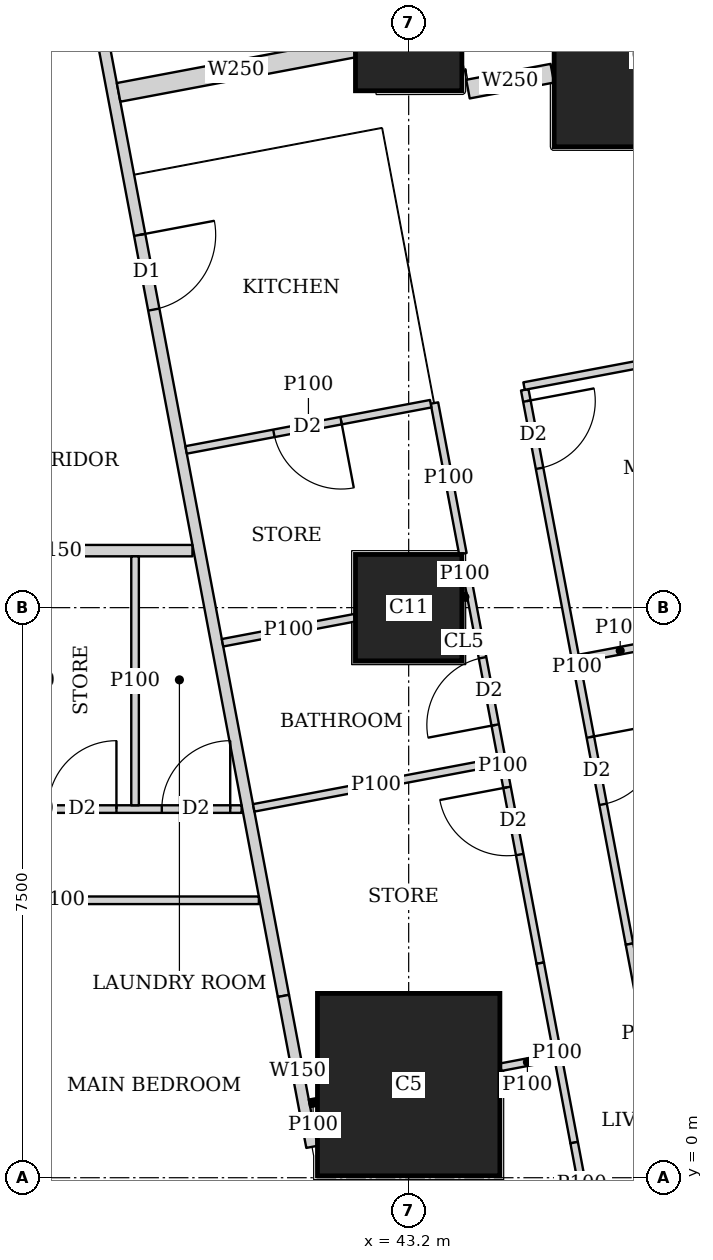
"""IFC4 building model, lengths in metres.
Left out: names, types, materials, properties, quantities, classifications, styles, units other than length and angle.
Written with IfcOpenShell. Run it as: python <this file> out.ifc"""

import sys

from ifc_helpers import new_model, si_unit, direction, frame, frame_2d, origin, origin_2d, place, context, subcontext, project, spatial, rectangle, extrude, element, fill, save


model = new_model("IFC4")
c1 = context("Model", 3, precision=1e-05, world=origin(), true_north=direction((0.0, 1.0)))
c2 = subcontext(c1, "Body", "Model", "MODEL_VIEW")
j1 = project(units=[si_unit("LENGTHUNIT", "METRE"), si_unit("PLANEANGLEUNIT", "RADIAN")], contexts=[c1])
p1 = place(None, origin())
s1 = spatial("IfcSite", under=j1, at=p1, CompositionType="ELEMENT")
p2 = place(p1, origin())
s2 = spatial("IfcBuilding", under=s1, at=p2, CompositionType="ELEMENT")
p3 = place(p2, frame((0.0, 0.0, 242.45)))
s3 = spatial("IfcBuildingStorey", under=s2, at=p3, CompositionType="ELEMENT", Elevation=242.45)
p4 = place(p3, frame((43.2, 1.225, 0.0), z_axis=(0.0, 0.0, 1.0), x_axis=(1.0, 0.0, 0.0)))
e1 = element("IfcColumn", 1, at=p4, inside=s3, PredefinedType="COLUMN", context=c2, shape_type="SweptSolid", body=[
    extrude(rectangle(XDim=2.4, YDim=2.4, at=origin_2d()), origin(), (0.0, 0.0, 1.0), 3.75),
])
for number, where, z_axis, x_axis in (
    (2, (43.2, 7.5, 0.0), (0.0, 0.0, 1.0), (1.0, 0.0, 0.0)),
    (3, (43.2, 15.0, 0.0), (0.0, 0.0, 1.0), (1.0, 0.0, 0.0)),
):
    element("IfcColumn", number, at=place(p3, frame(where, z_axis=z_axis, x_axis=x_axis)), inside=s3, PredefinedType="COLUMN", context=c2, shape_type="SweptSolid", body=[
        extrude(rectangle(XDim=1.4, YDim=1.4, at=origin_2d()), origin(), (0.0, 0.0, 1.0), 3.75),
    ])
p5 = place(p3, frame((46.314, 14.763, 0.0), z_axis=(0.0, 0.0, 1.0), x_axis=(1.0, 0.0, 0.0)))
e4 = element("IfcColumn", 4, at=p5, inside=s3, PredefinedType="COLUMN", context=c2, shape_type="SweptSolid", body=[
    extrude(rectangle(XDim=2.4, YDim=2.4, at=origin_2d()), origin(), (0.0, 0.0, 1.0), 3.75),
])
p6 = place(p3, frame((50.653, 2.703, 0.0), z_axis=(0.0, 0.0, 1.0), x_axis=(-0.185612026696, 0.982623109613, 0.0)))
e5 = element("IfcWall", 5, at=p6, inside=s3, PredefinedType="SOLIDWALL", context=c2, shape_type="SweptSolid", body=[
    extrude(rectangle(XDim=41.393, YDim=0.2, at=frame_2d((20.697, 0.0))), origin(), (0.0, 0.0, 1.0), 3.45),
])
p7 = place(p6, frame((1.633, 0.0, 0.9)))
e6 = element("IfcOpeningElement", 6, at=p7, cuts=e5, PredefinedType="OPENING", context=c2, shape_type="SweptSolid", body=[
    extrude(rectangle(XDim=1.8, YDim=1.5, at=frame_2d((0.9, 0.75))), frame((0.0, 0.11, 0.0), z_axis=(0.0, -1.0, 0.0), x_axis=(1.0, 0.0, 0.0)), (0.0, 0.0, 1.0), 0.22),
])
p8 = place(p6, frame((6.032, 0.0, 0.9)))
e7 = element("IfcOpeningElement", 7, at=p8, cuts=e5, PredefinedType="OPENING", context=c2, shape_type="SweptSolid", body=[
    extrude(rectangle(XDim=1.8, YDim=1.5, at=frame_2d((0.9, 0.75))), frame((0.0, 0.11, 0.0), z_axis=(0.0, -1.0, 0.0), x_axis=(1.0, 0.0, 0.0)), (0.0, 0.0, 1.0), 0.22),
])
p9 = place(p6, frame((9.848, 0.0, 0.9)))
e8 = element("IfcOpeningElement", 8, at=p9, cuts=e5, PredefinedType="OPENING", context=c2, shape_type="SweptSolid", body=[
    extrude(rectangle(XDim=1.8, YDim=1.5, at=frame_2d((0.9, 0.75))), frame((0.0, 0.11, 0.0), z_axis=(0.0, -1.0, 0.0), x_axis=(1.0, 0.0, 0.0)), (0.0, 0.0, 1.0), 0.22),
])
p10 = place(p6, frame((13.664, 0.0, 0.9)))
e9 = element("IfcOpeningElement", 9, at=p10, cuts=e5, PredefinedType="OPENING", context=c2, shape_type="SweptSolid", body=[
    extrude(rectangle(XDim=1.8, YDim=1.5, at=frame_2d((0.9, 0.75))), frame((0.0, 0.11, 0.0), z_axis=(0.0, -1.0, 0.0), x_axis=(1.0, 0.0, 0.0)), (0.0, 0.0, 1.0), 0.22),
])
p11 = place(p6, frame((17.481, 0.0, 0.9)))
e10 = element("IfcOpeningElement", 10, at=p11, cuts=e5, PredefinedType="OPENING", context=c2, shape_type="SweptSolid", body=[
    extrude(rectangle(XDim=1.8, YDim=1.5, at=frame_2d((0.9, 0.75))), frame((0.0, 0.11, 0.0), z_axis=(0.0, -1.0, 0.0), x_axis=(1.0, 0.0, 0.0)), (0.0, 0.0, 1.0), 0.22),
])
p12 = place(p6, frame((21.297, 0.0, 0.9)))
e11 = element("IfcOpeningElement", 11, at=p12, cuts=e5, PredefinedType="OPENING", context=c2, shape_type="SweptSolid", body=[
    extrude(rectangle(XDim=1.8, YDim=1.5, at=frame_2d((0.9, 0.75))), frame((0.0, 0.11, 0.0), z_axis=(0.0, -1.0, 0.0), x_axis=(1.0, 0.0, 0.0)), (0.0, 0.0, 1.0), 0.22),
])
p13 = place(p6, frame((25.113, 0.0, 0.9)))
e12 = element("IfcOpeningElement", 12, at=p13, cuts=e5, PredefinedType="OPENING", context=c2, shape_type="SweptSolid", body=[
    extrude(rectangle(XDim=1.8, YDim=1.5, at=frame_2d((0.9, 0.75))), frame((0.0, 0.11, 0.0), z_axis=(0.0, -1.0, 0.0), x_axis=(1.0, 0.0, 0.0)), (0.0, 0.0, 1.0), 0.22),
])
p14 = place(p6, frame((28.93, 0.0, 0.9)))
e13 = element("IfcOpeningElement", 13, at=p14, cuts=e5, PredefinedType="OPENING", context=c2, shape_type="SweptSolid", body=[
    extrude(rectangle(XDim=1.8, YDim=1.5, at=frame_2d((0.9, 0.75))), frame((0.0, 0.11, 0.0), z_axis=(0.0, -1.0, 0.0), x_axis=(1.0, 0.0, 0.0)), (0.0, 0.0, 1.0), 0.22),
])
p15 = place(p6, frame((32.746, 0.0, 0.9)))
e14 = element("IfcOpeningElement", 14, at=p15, cuts=e5, PredefinedType="OPENING", context=c2, shape_type="SweptSolid", body=[
    extrude(rectangle(XDim=1.8, YDim=1.5, at=frame_2d((0.9, 0.75))), frame((0.0, 0.11, 0.0), z_axis=(0.0, -1.0, 0.0), x_axis=(1.0, 0.0, 0.0)), (0.0, 0.0, 1.0), 0.22),
])
p16 = place(p6, frame((36.481, 0.0, 0.9)))
e15 = element("IfcOpeningElement", 15, at=p16, cuts=e5, PredefinedType="OPENING", context=c2, shape_type="SweptSolid", body=[
    extrude(rectangle(XDim=1.8, YDim=1.5, at=frame_2d((0.9, 0.75))), frame((0.0, 0.11, 0.0), z_axis=(0.0, -1.0, 0.0), x_axis=(1.0, 0.0, 0.0)), (0.0, 0.0, 1.0), 0.22),
])
p17 = place(p3, frame((40.355, 8.25, 0.0), z_axis=(0.0, 0.0, 1.0), x_axis=(-1.0, 0.0, 0.0)))
e16 = element("IfcWall", 16, at=p17, inside=s3, PredefinedType="SOLIDWALL", context=c2, shape_type="SweptSolid", body=[
    extrude(rectangle(XDim=3.654, YDim=0.15, at=frame_2d((1.827, 0.0))), origin(), (0.0, 0.0, 1.0), 3.45),
])
p18 = place(p3, frame((33.933, 42.73, 0.0), z_axis=(0.0, 0.0, 1.0), x_axis=(0.185595417643, -0.982626246825, 0.0)))
e17 = element("IfcWall", 17, at=p18, inside=s3, PredefinedType="SOLIDWALL", context=c2, shape_type="SweptSolid", body=[
    extrude(rectangle(XDim=41.051, YDim=0.15, at=frame_2d((20.525, 0.0))), origin(), (0.0, 0.0, 1.0), 2.45),
])
p19 = place(p18, frame((12.266, 0.0, 0.0)))
e18 = element("IfcOpeningElement", 18, at=p19, cuts=e17, PredefinedType="OPENING", context=c2, shape_type="SweptSolid", body=[
    extrude(rectangle(XDim=1.0, YDim=2.1, at=frame_2d((0.5, 1.05))), frame((0.0, 0.085, 0.0), z_axis=(0.0, -1.0, 0.0), x_axis=(1.0, 0.0, 0.0)), (0.0, 0.0, 1.0), 0.17),
])
p20 = place(p18, frame((16.082, 0.0, 0.0)))
e19 = element("IfcOpeningElement", 19, at=p20, cuts=e17, PredefinedType="OPENING", context=c2, shape_type="SweptSolid", body=[
    extrude(rectangle(XDim=1.0, YDim=2.1, at=frame_2d((0.5, 1.05))), frame((0.0, 0.085, 0.0), z_axis=(0.0, -1.0, 0.0), x_axis=(1.0, 0.0, 0.0)), (0.0, 0.0, 1.0), 0.17),
])
p21 = place(p18, frame((30.862, 0.0, 0.0)))
e20 = element("IfcOpeningElement", 20, at=p21, cuts=e17, PredefinedType="OPENING", context=c2, shape_type="SweptSolid", body=[
    extrude(rectangle(XDim=1.0, YDim=2.1, at=frame_2d((0.5, 1.05))), frame((0.0, 0.085, 0.0), z_axis=(0.0, -1.0, 0.0), x_axis=(1.0, 0.0, 0.0)), (0.0, 0.0, 1.0), 0.17),
])
p22 = place(p3, frame((41.552, 2.392, 0.0), z_axis=(0.0, 0.0, 1.0), x_axis=(0.185535500323, -0.982637561932, 0.0)))
e21 = element("IfcWall", 21, at=p22, inside=s3, PredefinedType="SOLIDWALL", context=c2, shape_type="SweptSolid", body=[
    extrude(rectangle(XDim=2.021, YDim=0.15, at=frame_2d((1.011, 0.0))), origin(), (0.0, 0.0, 1.0), 2.0),
])
p23 = place(p3, frame((41.229, 3.65, 0.0), z_axis=(0.0, 0.0, 1.0), x_axis=(-1.0, 0.0, 0.0)))
e22 = element("IfcWall", 22, at=p23, inside=s3, PredefinedType="PARTITIONING", context=c2, shape_type="SweptSolid", body=[
    extrude(rectangle(XDim=5.229, YDim=0.1, at=frame_2d((2.615, 0.0))), origin(), (0.0, 0.0, 1.0), 3.45),
])
p24 = place(p23, frame((4.129, 0.0, 0.0)))
e23 = element("IfcOpeningElement", 23, at=p24, cuts=e22, PredefinedType="OPENING", context=c2, shape_type="SweptSolid", body=[
    extrude(rectangle(XDim=0.9, YDim=2.1, at=frame_2d((0.45, 1.05))), frame((0.0, 0.06, 0.0), z_axis=(0.0, -1.0, 0.0), x_axis=(1.0, 0.0, 0.0)), (0.0, 0.0, 1.0), 0.12),
])
p25 = place(p3, frame((41.002, 4.85, 0.0), z_axis=(0.0, 0.0, 1.0), x_axis=(-1.0, 0.0, 0.0)))
e24 = element("IfcWall", 24, at=p25, inside=s3, PredefinedType="PARTITIONING", context=c2, shape_type="SweptSolid", body=[
    extrude(rectangle(XDim=5.002, YDim=0.1, at=frame_2d((2.501, 0.0))), origin(), (0.0, 0.0, 1.0), 3.45),
])
p26 = place(p25, frame((3.447, 0.0, 0.0)))
e25 = element("IfcOpeningElement", 25, at=p26, cuts=e24, PredefinedType="OPENING", context=c2, shape_type="SweptSolid", body=[
    extrude(rectangle(XDim=0.9, YDim=2.1, at=frame_2d((0.45, 1.05))), frame((0.0, 0.06, 0.0), z_axis=(0.0, -1.0, 0.0), x_axis=(1.0, 0.0, 0.0)), (0.0, 0.0, 1.0), 0.12),
])
p27 = place(p25, frame((0.15, 0.0, 0.0)))
e26 = element("IfcOpeningElement", 26, at=p27, cuts=e24, PredefinedType="OPENING", context=c2, shape_type="SweptSolid", body=[
    extrude(rectangle(XDim=0.9, YDim=2.1, at=frame_2d((0.45, 1.05))), frame((0.0, 0.06, 0.0), z_axis=(0.0, -1.0, 0.0), x_axis=(1.0, 0.0, 0.0)), (0.0, 0.0, 1.0), 0.12),
])
p28 = place(p25, frame((1.647, 0.0, 0.0)))
e27 = element("IfcOpeningElement", 27, at=p28, cuts=e24, PredefinedType="OPENING", context=c2, shape_type="SweptSolid", body=[
    extrude(rectangle(XDim=0.9, YDim=2.1, at=frame_2d((0.45, 1.05))), frame((0.0, 0.06, 0.0), z_axis=(0.0, -1.0, 0.0), x_axis=(1.0, 0.0, 0.0)), (0.0, 0.0, 1.0), 0.12),
])
p29 = place(p3, frame((39.6, 4.9, 0.0), z_axis=(0.0, 0.0, 1.0), x_axis=(0.0, 1.0, 0.0)))
e28 = element("IfcWall", 28, at=p29, inside=s3, PredefinedType="PARTITIONING", context=c2, shape_type="SweptSolid", body=[
    extrude(rectangle(XDim=3.275, YDim=0.1, at=frame_2d((1.638, 0.0))), origin(), (0.0, 0.0, 1.0), 3.45),
])
p30 = place(p3, frame((44.727, 10.366, 0.0), z_axis=(0.0, 0.0, 1.0), x_axis=(0.185678775129, -0.982610498858, 0.0)))
e29 = element("IfcWall", 29, at=p30, inside=s3, PredefinedType="PARTITIONING", context=c2, shape_type="SweptSolid", body=[
    extrude(rectangle(XDim=7.421, YDim=0.1, at=frame_2d((3.71, 0.0))), origin(), (0.0, 0.0, 1.0), 3.45),
])
p31 = place(p30, frame((0.151, 0.0, 0.0)))
e30 = element("IfcOpeningElement", 30, at=p31, cuts=e29, PredefinedType="OPENING", context=c2, shape_type="SweptSolid", body=[
    extrude(rectangle(XDim=0.9, YDim=2.1, at=frame_2d((0.45, 1.05))), frame((0.0, 0.06, 0.0), z_axis=(0.0, -1.0, 0.0), x_axis=(1.0, 0.0, 0.0)), (0.0, 0.0, 1.0), 0.12),
])
p32 = place(p30, frame((4.65, 0.0, 0.0)))
e31 = element("IfcOpeningElement", 31, at=p32, cuts=e29, PredefinedType="OPENING", context=c2, shape_type="SweptSolid", body=[
    extrude(rectangle(XDim=0.9, YDim=2.1, at=frame_2d((0.45, 1.05))), frame((0.0, 0.06, 0.0), z_axis=(0.0, -1.0, 0.0), x_axis=(1.0, 0.0, 0.0)), (0.0, 0.0, 1.0), 0.12),
])
p33 = place(p3, frame((46.105, 3.074, 0.0), z_axis=(0.0, 0.0, 1.0), x_axis=(0.185631845838, -0.982619365681, 0.0)))
e32 = element("IfcWall", 32, at=p33, inside=s3, PredefinedType="PARTITIONING", context=c2, shape_type="SweptSolid", body=[
    extrude(rectangle(XDim=2.403, YDim=0.1, at=frame_2d((1.201, 0.0))), origin(), (0.0, 0.0, 1.0), 2.0),
])
p34 = place(p3, frame((43.539, 10.192, 0.0), z_axis=(0.0, 0.0, 1.0), x_axis=(0.185443145218, -0.982654995353, 0.0)))
e33 = element("IfcWall", 33, at=p34, inside=s3, PredefinedType="PARTITIONING", context=c2, shape_type="SweptSolid", body=[
    extrude(rectangle(XDim=2.017, YDim=0.1, at=frame_2d((1.008, 0.0))), origin(), (0.0, 0.0, 1.0), 3.45),
])
p35 = place(p3, frame((43.949, 8.02, 0.0), z_axis=(0.0, 0.0, 1.0), x_axis=(0.185656792073, -0.982614652627, 0.0)))
e34 = element("IfcWall", 34, at=p35, inside=s3, PredefinedType="PARTITIONING", context=c2, shape_type="SweptSolid", body=[
    extrude(rectangle(XDim=5.289, YDim=0.1, at=frame_2d((2.645, 0.0))), origin(), (0.0, 0.0, 1.0), 3.45),
])
p36 = place(p35, frame((1.2, 0.0, 0.0)))
e35 = element("IfcOpeningElement", 35, at=p36, cuts=e34, PredefinedType="OPENING", context=c2, shape_type="SweptSolid", body=[
    extrude(rectangle(XDim=0.9, YDim=2.1, at=frame_2d((0.45, 1.05))), frame((0.0, 0.06, 0.0), z_axis=(0.0, -1.0, 0.0), x_axis=(1.0, 0.0, 0.0)), (0.0, 0.0, 1.0), 0.12),
])
p37 = place(p35, frame((2.935, 0.0, 0.0)))
e36 = element("IfcOpeningElement", 36, at=p37, cuts=e34, PredefinedType="OPENING", context=c2, shape_type="SweptSolid", body=[
    extrude(rectangle(XDim=0.9, YDim=2.1, at=frame_2d((0.45, 1.05))), frame((0.0, 0.06, 0.0), z_axis=(0.0, -1.0, 0.0), x_axis=(1.0, 0.0, 0.0)), (0.0, 0.0, 1.0), 0.12),
])
p38 = place(p3, frame((44.931, 2.823, 0.0), z_axis=(0.0, 0.0, 1.0), x_axis=(0.185631845838, -0.982619365681, 0.0)))
e37 = element("IfcWall", 37, at=p38, inside=s3, PredefinedType="PARTITIONING", context=c2, shape_type="SweptSolid", body=[
    extrude(rectangle(XDim=2.403, YDim=0.1, at=frame_2d((1.201, 0.0))), origin(), (0.0, 0.0, 1.0), 2.0),
])
p39 = place(p3, frame((45.377, 0.462, 0.0), z_axis=(0.0, 0.0, 1.0), x_axis=(0.185513480919, -0.982641719243, 0.0)))
e38 = element("IfcWall", 38, at=p39, inside=s3, PredefinedType="PARTITIONING", context=c2, shape_type="SweptSolid", body=[
    extrude(rectangle(XDim=1.095, YDim=0.1, at=frame_2d((0.547, 0.0))), origin(), (0.0, 0.0, 1.0), 3.45),
])
p40 = place(p3, frame((48.943, 11.213, 0.0), z_axis=(0.0, 0.0, 1.0), x_axis=(-0.982633535512, -0.185556823879, 0.0)))
e39 = element("IfcWall", 39, at=p40, inside=s3, PredefinedType="PARTITIONING", context=c2, shape_type="SweptSolid", body=[
    extrude(rectangle(XDim=4.3, YDim=0.1, at=frame_2d((2.15, 0.0))), origin(), (0.0, 0.0, 1.0), 2.0),
])
p41 = place(p3, frame((46.52, 7.035, 0.0), z_axis=(0.0, 0.0, 1.0), x_axis=(-0.982620932907, -0.185623549726, 0.0)))
e40 = element("IfcWall", 40, at=p41, inside=s3, PredefinedType="PARTITIONING", context=c2, shape_type="SweptSolid", body=[
    extrude(rectangle(XDim=1.093, YDim=0.1, at=frame_2d((0.546, 0.0))), origin(), (0.0, 0.0, 1.0), 3.45),
])
p42 = place(p3, frame((43.49, 10.183, 0.0), z_axis=(0.0, 0.0, 1.0), x_axis=(-0.982607026909, -0.185697147715, 0.0)))
e41 = element("IfcWall", 41, at=p42, inside=s3, PredefinedType="PARTITIONING", context=c2, shape_type="SweptSolid", body=[
    extrude(rectangle(XDim=3.275, YDim=0.1, at=frame_2d((1.637, 0.0))), origin(), (0.0, 0.0, 1.0), 3.45),
])
p43 = place(p42, frame((1.2, 0.0, 0.0)))
e42 = element("IfcOpeningElement", 42, at=p43, cuts=e41, PredefinedType="OPENING", context=c2, shape_type="SweptSolid", body=[
    extrude(rectangle(XDim=0.9, YDim=2.1, at=frame_2d((0.45, 1.05))), frame((0.0, 0.06, 0.0), z_axis=(0.0, -1.0, 0.0), x_axis=(1.0, 0.0, 0.0)), (0.0, 0.0, 1.0), 0.12),
])
p44 = place(p3, frame((43.969, 7.646, 0.0), z_axis=(0.0, 0.0, 1.0), x_axis=(-0.983147034646, -0.182816597351, 0.0)))
e43 = element("IfcWall", 43, at=p44, inside=s3, PredefinedType="PARTITIONING", context=c2, shape_type="SweptSolid", body=[
    extrude(rectangle(XDim=0.06, YDim=0.1, at=frame_2d((0.03, 0.0))), origin(), (0.0, 0.0, 1.0), 3.45),
])
p45 = place(p3, frame((42.49, 7.367, 0.0), z_axis=(0.0, 0.0, 1.0), x_axis=(-0.982585223885, -0.185812480215, 0.0)))
e44 = element("IfcWall", 44, at=p45, inside=s3, PredefinedType="PARTITIONING", context=c2, shape_type="SweptSolid", body=[
    extrude(rectangle(XDim=1.77, YDim=0.1, at=frame_2d((0.885, 0.0))), origin(), (0.0, 0.0, 1.0), 3.45),
])
p46 = place(p3, frame((45.114, 1.587, 0.0), z_axis=(0.0, 0.0, 1.0), x_axis=(-0.982671022916, -0.185358195723, 0.0)))
e45 = element("IfcWall", 45, at=p46, inside=s3, PredefinedType="PARTITIONING", context=c2, shape_type="SweptSolid", body=[
    extrude(rectangle(XDim=0.717, YDim=0.1, at=frame_2d((0.358, 0.0))), origin(), (0.0, 0.0, 1.0), 2.0),
])
p47 = place(p3, frame((41.99, 0.997, 0.0), z_axis=(0.0, 0.0, 1.0), x_axis=(-0.982382747416, -0.186880008506, 0.0)))
e46 = element("IfcWall", 46, at=p47, inside=s3, PredefinedType="PARTITIONING", context=c2, shape_type="SweptSolid", body=[
    extrude(rectangle(XDim=0.097, YDim=0.1, at=frame_2d((0.048, 0.0))), origin(), (0.0, 0.0, 1.0), 2.0),
])
p48 = place(p3, frame((44.379, 5.474, 0.0), z_axis=(0.0, 0.0, 1.0), x_axis=(-0.982607026909, -0.185697147715, 0.0)))
e47 = element("IfcWall", 47, at=p48, inside=s3, PredefinedType="PARTITIONING", context=c2, shape_type="SweptSolid", body=[
    extrude(rectangle(XDim=3.275, YDim=0.1, at=frame_2d((1.637, 0.0))), origin(), (0.0, 0.0, 1.0), 3.45),
])
p49 = place(p3, frame((45.09, 14.531, 0.0), z_axis=(0.0, 0.0, 1.0), x_axis=(-0.982737354171, -0.185006196431, 0.0)))
e48 = element("IfcWall", 48, at=p49, inside=s3, PredefinedType="SOLIDWALL", context=c2, shape_type="SweptSolid", body=[
    extrude(rectangle(XDim=1.13, YDim=0.25, at=frame_2d((0.565, 0.0))), origin(), (0.0, 0.0, 1.0), 2.0),
])
p50 = place(p3, frame((42.476, 14.863, 0.0), z_axis=(0.0, 0.0, 1.0), x_axis=(-0.982638716117, -0.185529387398, 0.0)))
e49 = element("IfcWall", 49, at=p50, inside=s3, PredefinedType="SOLIDWALL", context=c2, shape_type="SweptSolid", body=[
    extrude(rectangle(XDim=3.148, YDim=0.25, at=frame_2d((1.574, 0.0))), origin(), (0.0, 0.0, 1.0), 3.45),
])
p51 = place(p27, origin())
e50 = element("IfcDoor", 50, at=p51, inside=s3, OperationType="SINGLE_SWING_RIGHT", PredefinedType="DOOR", context=c2, shape_type="SweptSolid", body=[
    extrude(rectangle(XDim=0.9, YDim=2.1, at=frame_2d((0.45, 1.05))), frame((0.0, 0.025, 0.0), z_axis=(0.0, -1.0, 0.0), x_axis=(1.0, 0.0, 0.0)), (0.0, 0.0, 1.0), 0.05),
])
fill(e26, e50)
p52 = place(p28, origin())
e51 = element("IfcDoor", 51, at=p52, inside=s3, OperationType="SINGLE_SWING_RIGHT", PredefinedType="DOOR", context=c2, shape_type="SweptSolid", body=[
    extrude(rectangle(XDim=0.9, YDim=2.1, at=frame_2d((0.45, 1.05))), frame((0.0, 0.025, 0.0), z_axis=(0.0, -1.0, 0.0), x_axis=(1.0, 0.0, 0.0)), (0.0, 0.0, 1.0), 0.05),
])
fill(e27, e51)
p53 = place(p31, origin())
e52 = element("IfcDoor", 52, at=p53, inside=s3, OperationType="SINGLE_SWING_LEFT", PredefinedType="DOOR", context=c2, shape_type="SweptSolid", body=[
    extrude(rectangle(XDim=0.9, YDim=2.1, at=frame_2d((0.45, 1.05))), frame((0.0, 0.025, 0.0), z_axis=(0.0, -1.0, 0.0), x_axis=(1.0, 0.0, 0.0)), (0.0, 0.0, 1.0), 0.05),
])
fill(e30, e52)
p54 = place(p32, origin())
e53 = element("IfcDoor", 53, at=p54, inside=s3, OperationType="SINGLE_SWING_LEFT", PredefinedType="DOOR", context=c2, shape_type="SweptSolid", body=[
    extrude(rectangle(XDim=0.9, YDim=2.1, at=frame_2d((0.45, 1.05))), frame((0.0, 0.025, 0.0), z_axis=(0.0, -1.0, 0.0), x_axis=(1.0, 0.0, 0.0)), (0.0, 0.0, 1.0), 0.05),
])
fill(e31, e53)
p55 = place(p36, origin())
e54 = element("IfcDoor", 54, at=p55, inside=s3, OperationType="SINGLE_SWING_LEFT", PredefinedType="DOOR", context=c2, shape_type="SweptSolid", body=[
    extrude(rectangle(XDim=0.9, YDim=2.1, at=frame_2d((0.45, 1.05))), frame((0.0, 0.025, 0.0), z_axis=(0.0, -1.0, 0.0), x_axis=(1.0, 0.0, 0.0)), (0.0, 0.0, 1.0), 0.05),
])
fill(e35, e54)
p56 = place(p37, origin())
e55 = element("IfcDoor", 55, at=p56, inside=s3, OperationType="SINGLE_SWING_RIGHT", PredefinedType="DOOR", context=c2, shape_type="SweptSolid", body=[
    extrude(rectangle(XDim=0.9, YDim=2.1, at=frame_2d((0.45, 1.05))), frame((0.0, 0.025, 0.0), z_axis=(0.0, -1.0, 0.0), x_axis=(1.0, 0.0, 0.0)), (0.0, 0.0, 1.0), 0.05),
])
fill(e36, e55)
p57 = place(p21, origin())
e56 = element("IfcDoor", 56, at=p57, inside=s3, OperationType="SINGLE_SWING_LEFT", PredefinedType="DOOR", context=c2, shape_type="SweptSolid", body=[
    extrude(rectangle(XDim=1.0, YDim=2.1, at=frame_2d((0.5, 1.05))), frame((0.0, 0.025, 0.0), z_axis=(0.0, -1.0, 0.0), x_axis=(1.0, 0.0, 0.0)), (0.0, 0.0, 1.0), 0.05),
])
fill(e20, e56)
p58 = place(p43, origin())
e57 = element("IfcDoor", 57, at=p58, inside=s3, OperationType="SINGLE_SWING_LEFT", PredefinedType="DOOR", context=c2, shape_type="SweptSolid", body=[
    extrude(rectangle(XDim=0.9, YDim=2.1, at=frame_2d((0.45, 1.05))), frame((0.0, 0.025, 0.0), z_axis=(0.0, -1.0, 0.0), x_axis=(1.0, 0.0, 0.0)), (0.0, 0.0, 1.0), 0.05),
])
fill(e42, e57)
save(model, sys.argv[1])
